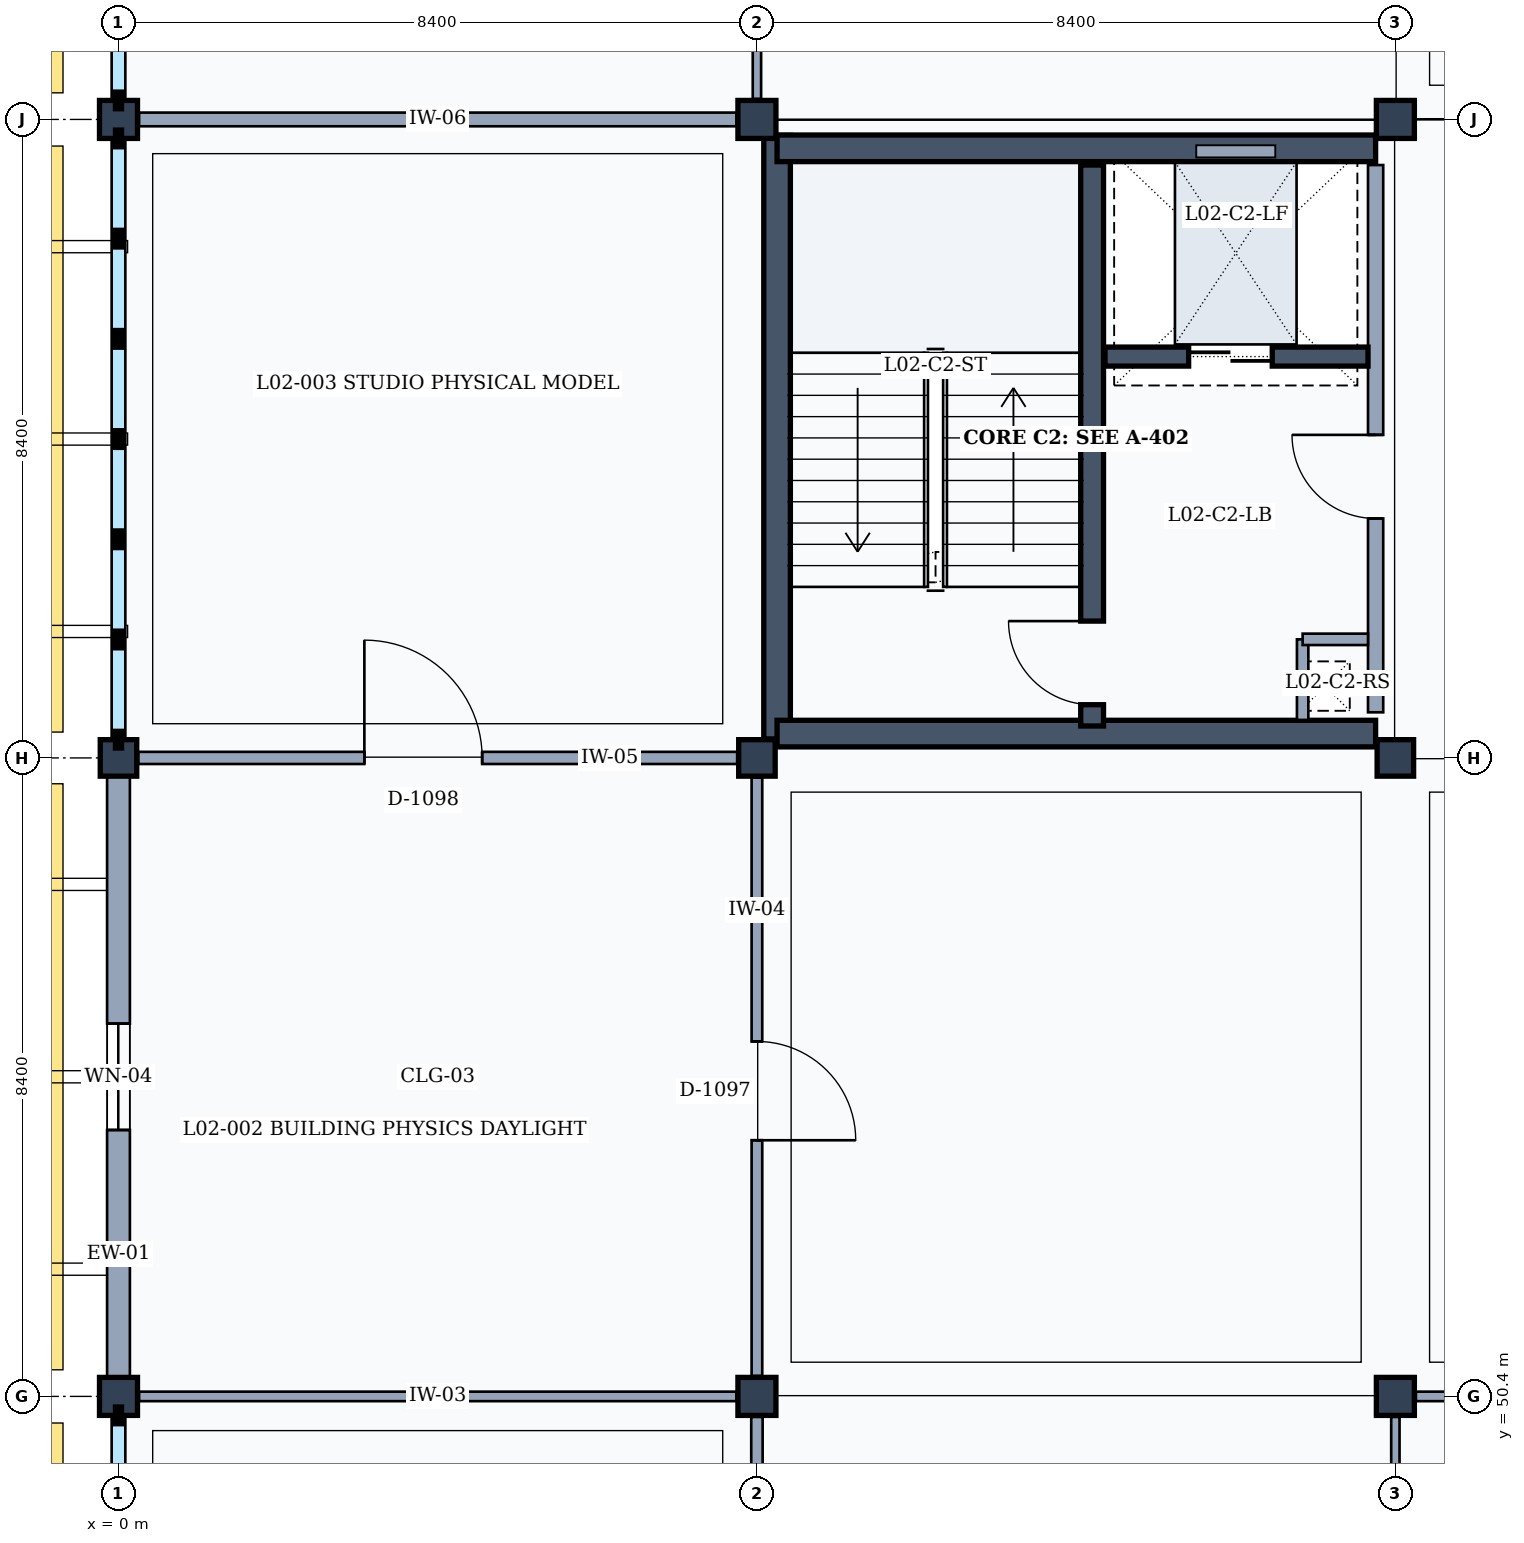
"""IFC4 building model, lengths in metres.
Left out: names, types, materials, properties, quantities, classifications, styles, units other than length and angle.
Written with IfcOpenShell. Run it as: python <this file> out.ifc"""

import sys

from ifc_helpers import new_model, si_unit, direction, frame, frame_2d, origin, origin_2d, place, context, subcontext, project, spatial, rectangle, extrude, element, fill, save


model = new_model("IFC4")
c1 = context("Model", 3, precision=1e-05, world=origin(), true_north=direction((0.0, 1.0)))
c2 = subcontext(c1, "Body", "Model", "MODEL_VIEW")
j1 = project(units=[si_unit("LENGTHUNIT", "METRE"), si_unit("PLANEANGLEUNIT", "RADIAN")], contexts=[c1])
p1 = place(None, origin())
s1 = spatial("IfcSite", under=j1, at=p1, CompositionType="ELEMENT")
p2 = place(p1, origin())
s2 = spatial("IfcBuilding", under=s1, at=p2, CompositionType="ELEMENT")
p3 = place(p2, frame((0.0, 0.0, 9.6)))
s3 = spatial("IfcBuildingStorey", under=s2, at=p3, CompositionType="ELEMENT", Elevation=9.6)
p4 = place(p3, frame((0.0, 50.4, 0.0), z_axis=(0.0, 0.0, 1.0), x_axis=(1.0, 0.0, 0.0)))
e1 = element("IfcColumn", 1, at=p4, inside=s3, PredefinedType="COLUMN", context=c2, shape_type="SweptSolid", body=[
    extrude(rectangle(XDim=0.5, YDim=0.5, at=origin_2d()), origin(), (0.0, 0.0, 1.0), 4.2),
])
p5 = place(p3, frame((0.0, 58.8, 0.0), z_axis=(0.0, 0.0, 1.0), x_axis=(1.0, 0.0, 0.0)))
e2 = element("IfcColumn", 2, at=p5, inside=s3, PredefinedType="COLUMN", context=c2, shape_type="SweptSolid", body=[
    extrude(rectangle(XDim=0.48, YDim=0.48, at=origin_2d()), origin(), (0.0, 0.0, 1.0), 4.2),
])
for number, where, z_axis, x_axis in (
    (3, (0.0, 67.2, 0.0), (0.0, 0.0, 1.0), (1.0, 0.0, 0.0)),
    (4, (8.4, 50.4, 0.0), (0.0, 0.0, 1.0), (1.0, 0.0, 0.0)),
):
    element("IfcColumn", number, at=place(p3, frame(where, z_axis=z_axis, x_axis=x_axis)), inside=s3, PredefinedType="COLUMN", context=c2, shape_type="SweptSolid", body=[
        extrude(rectangle(XDim=0.5, YDim=0.5, at=origin_2d()), origin(), (0.0, 0.0, 1.0), 4.2),
    ])
p6 = place(p3, frame((8.4, 58.8, 0.0), z_axis=(0.0, 0.0, 1.0), x_axis=(1.0, 0.0, 0.0)))
e5 = element("IfcColumn", 5, at=p6, inside=s3, PredefinedType="COLUMN", context=c2, shape_type="SweptSolid", body=[
    extrude(rectangle(XDim=0.48, YDim=0.48, at=origin_2d()), origin(), (0.0, 0.0, 1.0), 4.2),
])
for number, where, z_axis, x_axis in (
    (6, (8.4, 67.2, 0.0), (0.0, 0.0, 1.0), (1.0, 0.0, 0.0)),
    (7, (16.8, 50.4, 0.0), (0.0, 0.0, 1.0), (1.0, 0.0, 0.0)),
):
    element("IfcColumn", number, at=place(p3, frame(where, z_axis=z_axis, x_axis=x_axis)), inside=s3, PredefinedType="COLUMN", context=c2, shape_type="SweptSolid", body=[
        extrude(rectangle(XDim=0.5, YDim=0.5, at=origin_2d()), origin(), (0.0, 0.0, 1.0), 4.2),
    ])
p7 = place(p3, frame((16.8, 58.8, 0.0), z_axis=(0.0, 0.0, 1.0), x_axis=(1.0, 0.0, 0.0)))
e8 = element("IfcColumn", 8, at=p7, inside=s3, PredefinedType="COLUMN", context=c2, shape_type="SweptSolid", body=[
    extrude(rectangle(XDim=0.48, YDim=0.48, at=origin_2d()), origin(), (0.0, 0.0, 1.0), 4.2),
])
p8 = place(p3, frame((16.8, 67.2, 0.0), z_axis=(0.0, 0.0, 1.0), x_axis=(1.0, 0.0, 0.0)))
e9 = element("IfcColumn", 9, at=p8, inside=s3, PredefinedType="COLUMN", context=c2, shape_type="SweptSolid", body=[
    extrude(rectangle(XDim=0.5, YDim=0.5, at=origin_2d()), origin(), (0.0, 0.0, 1.0), 4.2),
])
p9 = place(p3, frame((0.0, 50.65, 0.0), z_axis=(0.0, 0.0, 1.0), x_axis=(0.0, 1.0, 0.0)))
e10 = element("IfcWall", 10, at=p9, inside=s3, PredefinedType="SOLIDWALL", context=c2, shape_type="SweptSolid", body=[
    extrude(rectangle(XDim=7.91, YDim=0.3, at=frame_2d((3.955, 0.0))), origin(), (0.0, 0.0, 1.0), 3.36),
])
p10 = place(p9, frame((3.255, 0.0, 0.9)))
e11 = element("IfcOpeningElement", 11, at=p10, cuts=e10, PredefinedType="OPENING", context=c2, shape_type="SweptSolid", body=[
    extrude(rectangle(XDim=1.4, YDim=2.1, at=frame_2d((0.7, 1.05))), frame((0.0, 0.16, 0.0), z_axis=(0.0, -1.0, 0.0), x_axis=(1.0, 0.0, 0.0)), (0.0, 0.0, 1.0), 0.32),
])
p11 = place(p3, frame((8.665, 59.05, 0.0), z_axis=(0.0, 0.0, 1.0), x_axis=(0.0, 1.0, 0.0)))
e12 = element("IfcWall", 12, at=p11, inside=s3, PredefinedType="SHEAR", context=c2, shape_type="SweptSolid", body=[
    extrude(rectangle(XDim=7.94, YDim=0.35, at=frame_2d((3.97, 0.0))), origin(), (0.0, 0.0, 1.0), 3.96),
])
p12 = place(p3, frame((8.665, 66.82, 0.0), z_axis=(0.0, 0.0, 1.0), x_axis=(1.0, 0.0, 0.0)))
e13 = element("IfcWall", 13, at=p12, inside=s3, PredefinedType="SHEAR", context=c2, shape_type="SweptSolid", body=[
    extrude(rectangle(XDim=7.875, YDim=0.35, at=frame_2d((3.938, 0.0))), origin(), (0.0, 0.0, 1.0), 3.96),
])
p13 = place(p3, frame((16.54, 66.6, 0.0), z_axis=(0.0, 0.0, 1.0), x_axis=(0.0, -1.0, 0.0)))
e14 = element("IfcWall", 14, at=p13, inside=s3, PredefinedType="PARTITIONING", context=c2, shape_type="SweptSolid", body=[
    extrude(rectangle(XDim=7.2, YDim=0.2, at=frame_2d((3.6, 0.0))), origin(), (0.0, 0.0, 1.0), 3.32),
])
p14 = place(p13, frame((3.55, 0.0, 0.0)))
e15 = element("IfcOpeningElement", 15, at=p14, cuts=e14, PredefinedType="OPENING", context=c2, shape_type="SweptSolid", body=[
    extrude(rectangle(XDim=1.1, YDim=2.15, at=frame_2d((0.55, 1.075))), frame((0.0, 0.11, 0.0), z_axis=(0.0, -1.0, 0.0), x_axis=(1.0, 0.0, 0.0)), (0.0, 0.0, 1.0), 0.22),
])
p15 = place(p3, frame((16.54, 59.12, 0.0), z_axis=(0.0, 0.0, 1.0), x_axis=(-1.0, 0.0, 0.0)))
e16 = element("IfcWall", 16, at=p15, inside=s3, PredefinedType="SHEAR", context=c2, shape_type="SweptSolid", body=[
    extrude(rectangle(XDim=7.875, YDim=0.35, at=frame_2d((3.938, 0.0))), origin(), (0.0, 0.0, 1.0), 3.96),
])
p16 = place(p3, frame((12.81, 59.22, 0.0), z_axis=(0.0, 0.0, 1.0), x_axis=(0.0, 1.0, 0.0)))
e17 = element("IfcWall", 17, at=p16, inside=s3, PredefinedType="SHEAR", context=c2, shape_type="SweptSolid", body=[
    extrude(rectangle(XDim=7.38, YDim=0.3, at=frame_2d((3.69, 0.0))), origin(), (0.0, 0.0, 1.0), 3.96),
])
p17 = place(p16, frame((0.28, 0.0, 0.0)))
e18 = element("IfcOpeningElement", 18, at=p17, cuts=e17, PredefinedType="OPENING", context=c2, shape_type="SweptSolid", body=[
    extrude(rectangle(XDim=1.1, YDim=2.15, at=frame_2d((0.55, 1.075))), frame((0.0, 0.16, 0.0), z_axis=(0.0, -1.0, 0.0), x_axis=(1.0, 0.0, 0.0)), (0.0, 0.0, 1.0), 0.32),
])
p18 = place(p3, frame((15.58, 60.36, 0.0), z_axis=(0.0, 0.0, 1.0), x_axis=(0.0, -1.0, 0.0)))
e19 = element("IfcWall", 19, at=p18, inside=s3, PredefinedType="PARTITIONING", context=c2, shape_type="SweptSolid", body=[
    extrude(rectangle(XDim=1.06, YDim=0.15, at=frame_2d((0.53, 0.0))), origin(), (0.0, 0.0, 1.0), 3.32),
])
p19 = place(p3, frame((15.58, 60.36, 0.0), z_axis=(0.0, 0.0, 1.0), x_axis=(1.0, 0.0, 0.0)))
e20 = element("IfcWall", 20, at=p19, inside=s3, PredefinedType="PARTITIONING", context=c2, shape_type="SweptSolid", body=[
    extrude(rectangle(XDim=0.86, YDim=0.15, at=frame_2d((0.43, 0.0))), origin(), (0.0, 0.0, 1.0), 3.32),
])
p20 = place(p3, frame((12.98, 64.08, 0.0), z_axis=(0.0, 0.0, 1.0), x_axis=(1.0, 0.0, 0.0)))
e21 = element("IfcWall", 21, at=p20, inside=s3, PredefinedType="SHEAR", context=c2, shape_type="SweptSolid", body=[
    extrude(rectangle(XDim=3.46, YDim=0.25, at=frame_2d((1.73, 0.0))), origin(), (0.0, 0.0, 1.0), 3.96),
])
p21 = place(p20, frame((1.1, 0.0, 0.0)))
e22 = element("IfcOpeningElement", 22, at=p21, cuts=e21, PredefinedType="OPENING", context=c2, shape_type="SweptSolid", body=[
    extrude(rectangle(XDim=1.1, YDim=2.15, at=frame_2d((0.55, 1.075))), frame((0.0, 0.135, 0.0), z_axis=(0.0, -1.0, 0.0), x_axis=(1.0, 0.0, 0.0)), (0.0, 0.0, 1.0), 0.27),
])
p22 = place(p3, frame((8.4, 42.22, 0.0), z_axis=(0.0, 0.0, 1.0), x_axis=(0.0, 1.0, 0.0)))
e23 = element("IfcWall", 23, at=p22, inside=s3, PredefinedType="PARTITIONING", context=c2, shape_type="SweptSolid", body=[
    extrude(rectangle(XDim=7.91, YDim=0.15, at=frame_2d((3.955, 0.0))), origin(), (0.0, 0.0, 1.0), 3.32),
])
p23 = place(p22, frame((3.175, 0.0, 0.0)))
e24 = element("IfcOpeningElement", 24, at=p23, cuts=e23, PredefinedType="OPENING", context=c2, shape_type="SweptSolid", body=[
    extrude(rectangle(XDim=1.15, YDim=2.25, at=frame_2d((0.575, 1.125))), frame((0.0, 0.085, 0.0), z_axis=(0.0, -1.0, 0.0), x_axis=(1.0, 0.0, 0.0)), (0.0, 0.0, 1.0), 0.17),
])
p24 = place(p3, frame((0.27, 50.4, 0.0), z_axis=(0.0, 0.0, 1.0), x_axis=(1.0, 0.0, 0.0)))
e25 = element("IfcWall", 25, at=p24, inside=s3, PredefinedType="PARTITIONING", context=c2, shape_type="SweptSolid", body=[
    extrude(rectangle(XDim=7.86, YDim=0.125, at=frame_2d((3.93, 0.0))), origin(), (0.0, 0.0, 1.0), 3.32),
])
p25 = place(p3, frame((8.4, 50.67, 0.0), z_axis=(0.0, 0.0, 1.0), x_axis=(0.0, 1.0, 0.0)))
e26 = element("IfcWall", 26, at=p25, inside=s3, PredefinedType="PARTITIONING", context=c2, shape_type="SweptSolid", body=[
    extrude(rectangle(XDim=7.87, YDim=0.14, at=frame_2d((3.935, 0.0))), origin(), (0.0, 0.0, 1.0), 3.32),
])
p26 = place(p25, frame((3.1, 0.0, 0.0)))
e27 = element("IfcOpeningElement", 27, at=p26, cuts=e26, PredefinedType="OPENING", context=c2, shape_type="SweptSolid", body=[
    extrude(rectangle(XDim=1.3, YDim=2.2, at=frame_2d((0.65, 1.1))), frame((0.0, 0.08, 0.0), z_axis=(0.0, -1.0, 0.0), x_axis=(1.0, 0.0, 0.0)), (0.0, 0.0, 1.0), 0.16),
])
p27 = place(p3, frame((0.26, 58.8, 0.0), z_axis=(0.0, 0.0, 1.0), x_axis=(1.0, 0.0, 0.0)))
e28 = element("IfcWall", 28, at=p27, inside=s3, PredefinedType="PARTITIONING", context=c2, shape_type="SweptSolid", body=[
    extrude(rectangle(XDim=7.88, YDim=0.16, at=frame_2d((3.94, 0.0))), origin(), (0.0, 0.0, 1.0), 3.32),
])
p28 = place(p27, frame((2.975, 0.0, 0.0)))
e29 = element("IfcOpeningElement", 29, at=p28, cuts=e28, PredefinedType="OPENING", context=c2, shape_type="SweptSolid", body=[
    extrude(rectangle(XDim=1.55, YDim=2.35, at=frame_2d((0.775, 1.175))), frame((0.0, 0.09, 0.0), z_axis=(0.0, -1.0, 0.0), x_axis=(1.0, 0.0, 0.0)), (0.0, 0.0, 1.0), 0.18),
])
p29 = place(p3, frame((0.27, 67.2, 0.0), z_axis=(0.0, 0.0, 1.0), x_axis=(1.0, 0.0, 0.0)))
e30 = element("IfcWall", 30, at=p29, inside=s3, PredefinedType="PARTITIONING", context=c2, shape_type="SweptSolid", body=[
    extrude(rectangle(XDim=7.86, YDim=0.18, at=frame_2d((3.93, 0.0))), origin(), (0.0, 0.0, 1.0), 3.32),
])
p30 = place(p3, frame((8.4, 67.47, 0.0), z_axis=(0.0, 0.0, 1.0), x_axis=(0.0, 1.0, 0.0)))
e31 = element("IfcWall", 31, at=p30, inside=s3, PredefinedType="PARTITIONING", context=c2, shape_type="SweptSolid", body=[
    extrude(rectangle(XDim=7.87, YDim=0.11, at=frame_2d((3.935, 0.0))), origin(), (0.0, 0.0, 1.0), 3.32),
])
p31 = place(p30, frame((2.9, 0.0, 0.0)))
e32 = element("IfcOpeningElement", 32, at=p31, cuts=e31, PredefinedType="OPENING", context=c2, shape_type="SweptSolid", body=[
    extrude(rectangle(XDim=1.7, YDim=2.3, at=frame_2d((0.85, 1.15))), frame((0.0, 0.065, 0.0), z_axis=(0.0, -1.0, 0.0), x_axis=(1.0, 0.0, 0.0)), (0.0, 0.0, 1.0), 0.13),
])
p32 = place(p3, frame((16.8, 42.21, 0.0), z_axis=(0.0, 0.0, 1.0), x_axis=(0.0, 1.0, 0.0)))
e33 = element("IfcWall", 33, at=p32, inside=s3, PredefinedType="PARTITIONING", context=c2, shape_type="SweptSolid", body=[
    extrude(rectangle(XDim=7.92, YDim=0.11, at=frame_2d((3.96, 0.0))), origin(), (0.0, 0.0, 1.0), 3.32),
])
p33 = place(p32, frame((3.05, 0.0, 0.0)))
e34 = element("IfcOpeningElement", 34, at=p33, cuts=e33, PredefinedType="OPENING", context=c2, shape_type="SweptSolid", body=[
    extrude(rectangle(XDim=1.4, YDim=2.25, at=frame_2d((0.7, 1.125))), frame((0.0, 0.065, 0.0), z_axis=(0.0, -1.0, 0.0), x_axis=(1.0, 0.0, 0.0)), (0.0, 0.0, 1.0), 0.13),
])
p34 = place(p3, frame((17.07, 50.4, 0.0), z_axis=(0.0, 0.0, 1.0), x_axis=(1.0, 0.0, 0.0)))
e35 = element("IfcWall", 35, at=p34, inside=s3, PredefinedType="PARTITIONING", context=c2, shape_type="SweptSolid", body=[
    extrude(rectangle(XDim=7.86, YDim=0.125, at=frame_2d((3.93, 0.0))), origin(), (0.0, 0.0, 1.0), 3.32),
])
p35 = place(p10, origin())
e36 = element("IfcWindow", 36, at=p35, inside=s3, PartitioningType="SINGLE_PANEL", PredefinedType="WINDOW", context=c2, shape_type="SweptSolid", body=[
    extrude(rectangle(XDim=1.4, YDim=2.1, at=frame_2d((0.7, 1.05))), frame((0.0, 0.03, 0.0), z_axis=(0.0, -1.0, 0.0), x_axis=(1.0, 0.0, 0.0)), (0.0, 0.0, 1.0), 0.06),
])
fill(e11, e36)
p36 = place(p14, frame((1.1, 0.0, 0.0), z_axis=(0.0, 0.0, 1.0), x_axis=(-1.0, 0.0, 0.0)))
e37 = element("IfcDoor", 37, at=p36, inside=s3, OperationType="SINGLE_SWING_RIGHT", PredefinedType="DOOR", context=c2, shape_type="SweptSolid", body=[
    extrude(rectangle(XDim=1.1, YDim=2.15, at=frame_2d((0.55, 1.075))), frame((0.0, 0.025, 0.0), z_axis=(0.0, -1.0, 0.0), x_axis=(1.0, 0.0, 0.0)), (0.0, 0.0, 1.0), 0.05),
])
fill(e15, e37)
p37 = place(p17, origin())
e38 = element("IfcDoor", 38, at=p37, inside=s3, OperationType="SINGLE_SWING_RIGHT", PredefinedType="DOOR", context=c2, shape_type="SweptSolid", body=[
    extrude(rectangle(XDim=1.1, YDim=2.15, at=frame_2d((0.55, 1.075))), frame((0.0, 0.025, 0.0), z_axis=(0.0, -1.0, 0.0), x_axis=(1.0, 0.0, 0.0)), (0.0, 0.0, 1.0), 0.05),
])
fill(e18, e38)
p38 = place(p21, origin())
e39 = element("IfcDoor", 39, at=p38, inside=s3, OperationType="DOUBLE_DOOR_SLIDING", PredefinedType="DOOR", context=c2, shape_type="SweptSolid", body=[
    extrude(rectangle(XDim=1.1, YDim=2.15, at=frame_2d((0.55, 1.075))), frame((0.0, 0.025, 0.0), z_axis=(0.0, -1.0, 0.0), x_axis=(1.0, 0.0, 0.0)), (0.0, 0.0, 1.0), 0.05),
])
fill(e22, e39)
p39 = place(p26, frame((1.3, 0.0, 0.0), z_axis=(0.0, 0.0, 1.0), x_axis=(-1.0, 0.0, 0.0)))
e40 = element("IfcDoor", 40, at=p39, inside=s3, OperationType="SINGLE_SWING_RIGHT", PredefinedType="DOOR", context=c2, shape_type="SweptSolid", body=[
    extrude(rectangle(XDim=1.3, YDim=2.2, at=frame_2d((0.65, 1.1))), frame((0.0, 0.025, 0.0), z_axis=(0.0, -1.0, 0.0), x_axis=(1.0, 0.0, 0.0)), (0.0, 0.0, 1.0), 0.05),
])
fill(e27, e40)
p40 = place(p28, origin())
e41 = element("IfcDoor", 41, at=p40, inside=s3, OperationType="SINGLE_SWING_LEFT", PredefinedType="DOOR", context=c2, shape_type="SweptSolid", body=[
    extrude(rectangle(XDim=1.55, YDim=2.35, at=frame_2d((0.775, 1.175))), frame((0.0, 0.025, 0.0), z_axis=(0.0, -1.0, 0.0), x_axis=(1.0, 0.0, 0.0)), (0.0, 0.0, 1.0), 0.05),
])
fill(e29, e41)
save(model, sys.argv[1])
